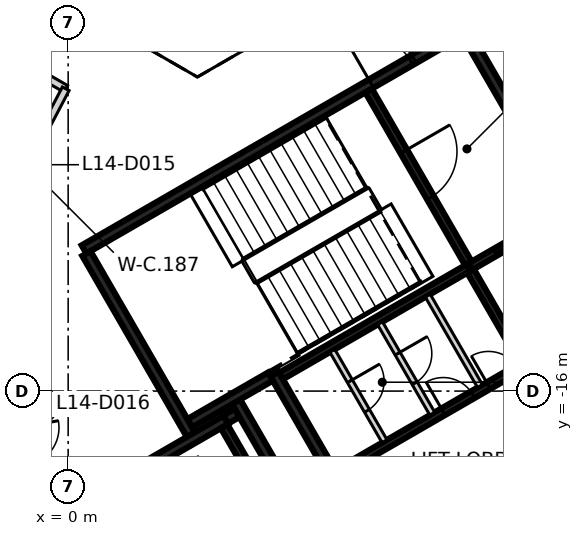
"""IFC4 building model, lengths in metres.
Left out: names, types, materials, properties, quantities, classifications, styles, units other than length and angle.
Written with IfcOpenShell. Run it as: python <this file> out.ifc"""

import sys

from ifc_helpers import new_model, si_unit, direction, frame, frame_2d, origin, place, context, subcontext, project, spatial, rectangle, extrude, element, fill, save


model = new_model("IFC4")
c1 = context("Model", 3, precision=1e-05, world=origin(), true_north=direction((0.0, 1.0)))
c2 = subcontext(c1, "Body", "Model", "MODEL_VIEW")
j1 = project(units=[si_unit("LENGTHUNIT", "METRE"), si_unit("PLANEANGLEUNIT", "RADIAN")], contexts=[c1])
p1 = place(None, origin())
s1 = spatial("IfcSite", under=j1, at=p1, CompositionType="ELEMENT")
p2 = place(p1, origin())
s2 = spatial("IfcBuilding", under=s1, at=p2, CompositionType="ELEMENT")
p3 = place(p2, frame((0.0, 0.0, 63.8)))
s3 = spatial("IfcBuildingStorey", under=s2, at=p3, CompositionType="ELEMENT", Elevation=63.8)
p4 = place(p3, frame((0.417, -12.273, 0.0), z_axis=(0.0, 0.0, 1.0), x_axis=(0.866021906294, 0.500006057782, 0.0)))
e1 = element("IfcWall", 1, at=p4, inside=s3, PredefinedType="SHEAR", context=c2, shape_type="SweptSolid", body=[
    extrude(rectangle(XDim=11.55, YDim=0.25, at=frame_2d((5.775, 0.0))), origin(), (0.0, 0.0, 1.0), 3.125),
])
p5 = place(p4, frame((10.025, 0.0, 0.0)))
e2 = element("IfcOpeningElement", 2, at=p5, cuts=e1, PredefinedType="OPENING", context=c2, shape_type="SweptSolid", body=[
    extrude(rectangle(XDim=1.2, YDim=2.1, at=frame_2d((0.6, 1.05))), frame((0.0, 0.135, 0.0), z_axis=(0.0, -1.0, 0.0), x_axis=(1.0, 0.0, 0.0)), (0.0, 0.0, 1.0), 0.27),
])
p6 = place(p4, frame((8.725, 0.0, 0.0)))
e3 = element("IfcOpeningElement", 3, at=p6, cuts=e1, PredefinedType="OPENING", context=c2, shape_type="SweptSolid", body=[
    extrude(rectangle(XDim=1.2, YDim=2.1, at=frame_2d((0.6, 1.05))), frame((0.0, 0.135, 0.0), z_axis=(0.0, -1.0, 0.0), x_axis=(1.0, 0.0, 0.0)), (0.0, 0.0, 1.0), 0.27),
])
p7 = place(p3, frame((3.235, -17.153, 0.0), z_axis=(0.0, 0.0, 1.0), x_axis=(-0.500008851346, 0.866020293397, 0.0)))
e4 = element("IfcWall", 4, at=p7, inside=s3, PredefinedType="SHEAR", context=c2, shape_type="SweptSolid", body=[
    extrude(rectangle(XDim=5.51, YDim=0.25, at=frame_2d((2.755, 0.0))), origin(), (0.0, 0.0, 1.0), 3.125),
])
p8 = place(p3, frame((10.483, -6.606, 0.0), z_axis=(0.0, 0.0, 1.0), x_axis=(0.49999885962, -0.866026062182, 0.0)))
e5 = element("IfcWall", 5, at=p8, inside=s3, PredefinedType="SHEAR", context=c2, shape_type="SweptSolid", body=[
    extrude(rectangle(XDim=5.225, YDim=0.25, at=frame_2d((2.612, 0.0))), origin(), (0.0, 0.0, 1.0), 3.125),
])
p9 = place(p3, frame((7.031, -18.327, 0.0), z_axis=(0.0, 0.0, 1.0), x_axis=(-0.499971222258, 0.866042017984, 0.0)))
e6 = element("IfcWall", 6, at=p9, inside=s3, PredefinedType="SHEAR", context=c2, shape_type="SweptSolid", body=[
    extrude(rectangle(XDim=3.2, YDim=0.25, at=frame_2d((1.6, 0.0))), origin(), (0.0, 0.0, 1.0), 3.125),
])
p10 = place(p3, frame((1.669, -18.19, 0.0), z_axis=(0.0, 0.0, 1.0), x_axis=(0.866042235819, 0.499970844928, 0.0)))
e7 = element("IfcWall", 7, at=p10, inside=s3, PredefinedType="SHEAR", context=c2, shape_type="SweptSolid", body=[
    extrude(rectangle(XDim=2.865, YDim=0.25, at=frame_2d((1.432, 0.0))), origin(), (0.0, 0.0, 1.0), 3.125),
])
p11 = place(p3, frame((4.414, -16.276, 0.0), z_axis=(0.0, 0.0, 1.0), x_axis=(0.500003324108, -0.866023484601, 0.0)))
e8 = element("IfcWall", 8, at=p11, inside=s3, PredefinedType="SHEAR", context=c2, shape_type="SweptSolid", body=[
    extrude(rectangle(XDim=3.085, YDim=0.25, at=frame_2d((1.542, 0.0))), origin(), (0.0, 0.0, 1.0), 3.125),
])
p12 = place(p3, frame((5.322, -15.619, 0.0), z_axis=(0.0, 0.0, 1.0), x_axis=(-0.866026229868, -0.499998569178, 0.0)))
e9 = element("IfcWall", 9, at=p12, inside=s3, PredefinedType="SHEAR", context=c2, shape_type="SweptSolid", body=[
    extrude(rectangle(XDim=2.449, YDim=0.25, at=frame_2d((1.225, 0.0))), origin(), (0.0, 0.0, 1.0), 3.125),
])
p13 = place(p3, frame((4.145, -16.749, 0.0), z_axis=(0.0, 0.0, 1.0), x_axis=(0.866185586049, 0.49972245349, 0.0)))
e10 = element("IfcWall", 10, at=p13, inside=s3, PredefinedType="SHEAR", context=c2, shape_type="SweptSolid", body=[
    extrude(rectangle(XDim=0.344, YDim=0.25, at=frame_2d((0.172, 0.0))), origin(), (0.0, 0.0, 1.0), 3.125),
])
p14 = place(p3, frame((9.052, -20.48, 0.0), z_axis=(0.0, 0.0, 1.0), x_axis=(0.866030299012, 0.499991521122, 0.0)))
e11 = element("IfcWall", 11, at=p14, inside=s3, PredefinedType="SHEAR", context=c2, shape_type="SweptSolid", body=[
    extrude(rectangle(XDim=6.1, YDim=0.2, at=frame_2d((3.05, 0.0))), origin(), (0.0, 0.0, 1.0), 3.125),
])
p15 = place(p14, frame((1.0, 0.0, 0.0)))
e12 = element("IfcOpeningElement", 12, at=p15, cuts=e11, PredefinedType="OPENING", context=c2, shape_type="SweptSolid", body=[
    extrude(rectangle(XDim=1.2, YDim=2.1, at=frame_2d((0.6, 1.05))), frame((0.0, 0.11, 0.0), z_axis=(0.0, -1.0, 0.0), x_axis=(1.0, 0.0, 0.0)), (0.0, 0.0, 1.0), 0.22),
])
p16 = place(p14, frame((4.05, 0.0, 0.0)))
e13 = element("IfcOpeningElement", 13, at=p16, cuts=e11, PredefinedType="OPENING", context=c2, shape_type="SweptSolid", body=[
    extrude(rectangle(XDim=1.2, YDim=2.1, at=frame_2d((0.6, 1.05))), frame((0.0, 0.11, 0.0), z_axis=(0.0, -1.0, 0.0), x_axis=(1.0, 0.0, 0.0)), (0.0, 0.0, 1.0), 0.22),
])
p17 = place(p3, frame((10.538, -12.752, 0.0), z_axis=(0.0, 0.0, 1.0), x_axis=(-0.866038630372, -0.499977090179, 0.0)))
e14 = element("IfcWall", 14, at=p17, inside=s3, PredefinedType="SHEAR", context=c2, shape_type="SweptSolid", body=[
    extrude(rectangle(XDim=5.699, YDim=0.2, at=frame_2d((2.85, 0.0))), origin(), (0.0, 0.0, 1.0), 3.125),
])
p18 = place(p3, frame((7.077, -18.156, 0.0), z_axis=(0.0, 0.0, 1.0), x_axis=(0.866038630372, 0.499977090179, 0.0)))
e15 = element("IfcWall", 15, at=p18, inside=s3, PredefinedType="SHEAR", context=c2, shape_type="SweptSolid", body=[
    extrude(rectangle(XDim=5.699, YDim=0.2, at=frame_2d((2.85, 0.0))), origin(), (0.0, 0.0, 1.0), 3.125),
])
p19 = place(p18, frame((3.224, 0.0, 0.0)))
e16 = element("IfcOpeningElement", 16, at=p19, cuts=e15, PredefinedType="OPENING", context=c2, shape_type="SweptSolid", body=[
    extrude(rectangle(XDim=0.9, YDim=2.1, at=frame_2d((0.45, 1.05))), frame((0.0, 0.11, 0.0), z_axis=(0.0, -1.0, 0.0), x_axis=(1.0, 0.0, 0.0)), (0.0, 0.0, 1.0), 0.22),
])
p20 = place(p18, frame((4.599, 0.0, 0.0)))
e17 = element("IfcOpeningElement", 17, at=p20, cuts=e15, PredefinedType="OPENING", context=c2, shape_type="SweptSolid", body=[
    extrude(rectangle(XDim=0.9, YDim=2.1, at=frame_2d((0.45, 1.05))), frame((0.0, 0.11, 0.0), z_axis=(0.0, -1.0, 0.0), x_axis=(1.0, 0.0, 0.0)), (0.0, 0.0, 1.0), 0.22),
])
p21 = place(p3, frame((7.906, -8.094, 0.0), z_axis=(0.0, 0.0, 1.0), x_axis=(0.500024287448, -0.866011380966, 0.0)))
e18 = element("IfcWall", 18, at=p21, inside=s3, PredefinedType="SHEAR", context=c2, shape_type="SweptSolid", body=[
    extrude(rectangle(XDim=5.251, YDim=0.2, at=frame_2d((2.625, 0.0))), origin(), (0.0, 0.0, 1.0), 3.125),
])
p22 = place(p21, frame((1.849, 0.0, 0.0)))
e19 = element("IfcOpeningElement", 19, at=p22, cuts=e18, PredefinedType="OPENING", context=c2, shape_type="SweptSolid", body=[
    extrude(rectangle(XDim=1.4, YDim=2.1, at=frame_2d((0.7, 1.05))), frame((0.0, 0.11, 0.0), z_axis=(0.0, -1.0, 0.0), x_axis=(1.0, 0.0, 0.0)), (0.0, 0.0, 1.0), 0.22),
])
p23 = place(p3, frame((5.503, -19.352, 0.0), z_axis=(0.0, 0.0, 1.0), x_axis=(-0.499986818241, 0.866033014143, 0.0)))
e20 = element("IfcWall", 20, at=p23, inside=s3, PredefinedType="SHEAR", context=c2, shape_type="SweptSolid", body=[
    extrude(rectangle(XDim=2.798, YDim=0.2, at=frame_2d((1.399, 0.0))), origin(), (0.0, 0.0, 1.0), 3.125),
])
p24 = place(p23, frame((0.949, 0.0, 0.0)))
e21 = element("IfcOpeningElement", 21, at=p24, cuts=e20, PredefinedType="OPENING", context=c2, shape_type="SweptSolid", body=[
    extrude(rectangle(XDim=0.9, YDim=2.1, at=frame_2d((0.45, 1.05))), frame((0.0, 0.11, 0.0), z_axis=(0.0, -1.0, 0.0), x_axis=(1.0, 0.0, 0.0)), (0.0, 0.0, 1.0), 0.22),
])
p25 = place(p3, frame((11.963, -15.22, 0.0), z_axis=(0.0, 0.0, 1.0), x_axis=(-0.500034990121, 0.866005201286, 0.0)))
e22 = element("IfcWall", 22, at=p25, inside=s3, PredefinedType="SHEAR", context=c2, shape_type="SweptSolid", body=[
    extrude(rectangle(XDim=2.75, YDim=0.2, at=frame_2d((1.375, 0.0))), origin(), (0.0, 0.0, 1.0), 3.125),
])
p26 = place(p3, frame((10.587, -12.723, 0.0), z_axis=(0.0, 0.0, 1.0), x_axis=(0.866037306777, 0.499979382845, 0.0)))
e23 = element("IfcWall", 23, at=p26, inside=s3, PredefinedType="SHEAR", context=c2, shape_type="SweptSolid", body=[
    extrude(rectangle(XDim=2.742, YDim=0.2, at=frame_2d((1.371, 0.0))), origin(), (0.0, 0.0, 1.0), 3.125),
])
p27 = place(p26, frame((0.743, 0.0, 0.0)))
e24 = element("IfcOpeningElement", 24, at=p27, cuts=e23, PredefinedType="OPENING", context=c2, shape_type="SweptSolid", body=[
    extrude(rectangle(XDim=1.3, YDim=2.1, at=frame_2d((0.65, 1.05))), frame((0.0, 0.11, 0.0), z_axis=(0.0, -1.0, 0.0), x_axis=(1.0, 0.0, 0.0)), (0.0, 0.0, 1.0), 0.22),
])
p28 = place(p3, frame((8.207, -14.214, 0.0), z_axis=(0.0, 0.0, 1.0), x_axis=(0.50002746344, -0.86600954718, 0.0)))
e25 = element("IfcWall", 25, at=p28, inside=s3, PredefinedType="PARTITIONING", context=c2, shape_type="SweptSolid", body=[
    extrude(rectangle(XDim=2.748, YDim=0.15, at=frame_2d((1.374, 0.0))), origin(), (0.0, 0.0, 1.0), 3.125),
])
p29 = place(p28, frame((0.924, 0.0, 0.0)))
e26 = element("IfcOpeningElement", 26, at=p29, cuts=e25, PredefinedType="OPENING", context=c2, shape_type="SweptSolid", body=[
    extrude(rectangle(XDim=0.9, YDim=2.1, at=frame_2d((0.45, 1.05))), frame((0.0, 0.085, 0.0), z_axis=(0.0, -1.0, 0.0), x_axis=(1.0, 0.0, 0.0)), (0.0, 0.0, 1.0), 0.17),
])
p30 = place(p3, frame((9.462, -13.489, 0.0), z_axis=(0.0, 0.0, 1.0), x_axis=(0.499988999718, -0.866031754707, 0.0)))
e27 = element("IfcWall", 27, at=p30, inside=s3, PredefinedType="PARTITIONING", context=c2, shape_type="SweptSolid", body=[
    extrude(rectangle(XDim=2.749, YDim=0.15, at=frame_2d((1.374, 0.0))), origin(), (0.0, 0.0, 1.0), 3.125),
])
p31 = place(p3, frame((6.951, -14.939, 0.0), z_axis=(0.0, 0.0, 1.0), x_axis=(0.499988999718, -0.866031754707, 0.0)))
e28 = element("IfcWall", 28, at=p31, inside=s3, PredefinedType="PARTITIONING", context=c2, shape_type="SweptSolid", body=[
    extrude(rectangle(XDim=2.749, YDim=0.15, at=frame_2d((1.374, 0.0))), origin(), (0.0, 0.0, 1.0), 3.125),
])
p32 = place(p31, frame((0.924, 0.0, 0.0)))
e29 = element("IfcOpeningElement", 29, at=p32, cuts=e28, PredefinedType="OPENING", context=c2, shape_type="SweptSolid", body=[
    extrude(rectangle(XDim=0.9, YDim=2.1, at=frame_2d((0.45, 1.05))), frame((0.0, 0.085, 0.0), z_axis=(0.0, -1.0, 0.0), x_axis=(1.0, 0.0, 0.0)), (0.0, 0.0, 1.0), 0.17),
])
p33 = place(p3, frame((-7.589, -3.702, 0.0), z_axis=(0.0, 0.0, 1.0), x_axis=(0.865995139556, -0.500052415518, 0.0)))
e30 = element("IfcWall", 30, at=p33, inside=s3, PredefinedType="PARTITIONING", context=c2, shape_type="SweptSolid", body=[
    extrude(rectangle(XDim=8.689, YDim=0.2, at=frame_2d((4.344, 0.0))), origin(), (0.0, 0.0, 1.0), 3.125),
])
p34 = place(p33, frame((0.749, 0.0, 0.0)))
e31 = element("IfcOpeningElement", 31, at=p34, cuts=e30, PredefinedType="OPENING", context=c2, shape_type="SweptSolid", body=[
    extrude(rectangle(XDim=1.0, YDim=2.1, at=frame_2d((0.5, 1.05))), frame((0.0, 0.11, 0.0), z_axis=(0.0, -1.0, 0.0), x_axis=(1.0, 0.0, 0.0)), (0.0, 0.0, 1.0), 0.22),
])
p35 = place(p33, frame((5.819, 0.0, 0.0)))
e32 = element("IfcOpeningElement", 32, at=p35, cuts=e30, PredefinedType="OPENING", context=c2, shape_type="SweptSolid", body=[
    extrude(rectangle(XDim=0.95, YDim=2.1, at=frame_2d((0.475, 1.05))), frame((0.0, 0.11, 0.0), z_axis=(0.0, -1.0, 0.0), x_axis=(1.0, 0.0, 0.0)), (0.0, 0.0, 1.0), 0.22),
])
p36 = place(p3, frame((-2.162, -12.041, 0.0), z_axis=(0.0, 0.0, 1.0), x_axis=(0.464956890881, 0.885333321197, 0.0)))
e33 = element("IfcWall", 33, at=p36, inside=s3, PredefinedType="PARTITIONING", context=c2, shape_type="SweptSolid", body=[
    extrude(rectangle(XDim=4.512, YDim=0.2, at=frame_2d((2.256, 0.0))), origin(), (0.0, 0.0, 1.0), 3.125),
])
p37 = place(p36, frame((1.756, 0.0, 0.0)))
e34 = element("IfcOpeningElement", 34, at=p37, cuts=e33, PredefinedType="OPENING", context=c2, shape_type="SweptSolid", body=[
    extrude(rectangle(XDim=1.0, YDim=2.1, at=frame_2d((0.5, 1.05))), frame((0.0, 0.11, 0.0), z_axis=(0.0, -1.0, 0.0), x_axis=(1.0, 0.0, 0.0)), (0.0, 0.0, 1.0), 0.22),
])
p38 = place(p27, origin())
e35 = element("IfcDoor", 35, at=p38, inside=s3, OperationType="SLIDING_TO_LEFT", PredefinedType="DOOR", context=c2, shape_type="SweptSolid", body=[
    extrude(rectangle(XDim=1.3, YDim=2.1, at=frame_2d((0.65, 1.05))), frame((0.0, 0.025, 0.0), z_axis=(0.0, -1.0, 0.0), x_axis=(1.0, 0.0, 0.0)), (0.0, 0.0, 1.0), 0.05),
])
fill(e24, e35)
p39 = place(p5, origin())
e36 = element("IfcDoor", 36, at=p39, inside=s3, OperationType="SINGLE_SWING_LEFT", PredefinedType="DOOR", context=c2, shape_type="SweptSolid", body=[
    extrude(rectangle(XDim=1.2, YDim=2.1, at=frame_2d((0.6, 1.05))), frame((0.0, 0.025, 0.0), z_axis=(0.0, -1.0, 0.0), x_axis=(1.0, 0.0, 0.0)), (0.0, 0.0, 1.0), 0.05),
])
fill(e2, e36)
p40 = place(p6, origin())
e37 = element("IfcDoor", 37, at=p40, inside=s3, OperationType="SINGLE_SWING_RIGHT", PredefinedType="DOOR", context=c2, shape_type="SweptSolid", body=[
    extrude(rectangle(XDim=1.2, YDim=2.1, at=frame_2d((0.6, 1.05))), frame((0.0, 0.025, 0.0), z_axis=(0.0, -1.0, 0.0), x_axis=(1.0, 0.0, 0.0)), (0.0, 0.0, 1.0), 0.05),
])
fill(e3, e37)
p41 = place(p22, origin())
e38 = element("IfcDoor", 38, at=p41, inside=s3, OperationType="SINGLE_SWING_LEFT", PredefinedType="DOOR", context=c2, shape_type="SweptSolid", body=[
    extrude(rectangle(XDim=1.4, YDim=2.1, at=frame_2d((0.7, 1.05))), frame((0.0, 0.025, 0.0), z_axis=(0.0, -1.0, 0.0), x_axis=(1.0, 0.0, 0.0)), (0.0, 0.0, 1.0), 0.05),
])
fill(e19, e38)
p42 = place(p19, origin())
e39 = element("IfcDoor", 39, at=p42, inside=s3, OperationType="SINGLE_SWING_RIGHT", PredefinedType="DOOR", context=c2, shape_type="SweptSolid", body=[
    extrude(rectangle(XDim=0.9, YDim=2.1, at=frame_2d((0.45, 1.05))), frame((0.0, 0.025, 0.0), z_axis=(0.0, -1.0, 0.0), x_axis=(1.0, 0.0, 0.0)), (0.0, 0.0, 1.0), 0.05),
])
fill(e16, e39)
p43 = place(p20, origin())
e40 = element("IfcDoor", 40, at=p43, inside=s3, OperationType="SINGLE_SWING_LEFT", PredefinedType="DOOR", context=c2, shape_type="SweptSolid", body=[
    extrude(rectangle(XDim=0.9, YDim=2.1, at=frame_2d((0.45, 1.05))), frame((0.0, 0.025, 0.0), z_axis=(0.0, -1.0, 0.0), x_axis=(1.0, 0.0, 0.0)), (0.0, 0.0, 1.0), 0.05),
])
fill(e17, e40)
p44 = place(p29, origin())
e41 = element("IfcDoor", 41, at=p44, inside=s3, OperationType="SINGLE_SWING_LEFT", PredefinedType="DOOR", context=c2, shape_type="SweptSolid", body=[
    extrude(rectangle(XDim=0.9, YDim=2.1, at=frame_2d((0.45, 1.05))), frame((0.0, 0.025, 0.0), z_axis=(0.0, -1.0, 0.0), x_axis=(1.0, 0.0, 0.0)), (0.0, 0.0, 1.0), 0.05),
])
fill(e26, e41)
p45 = place(p32, origin())
e42 = element("IfcDoor", 42, at=p45, inside=s3, OperationType="SINGLE_SWING_RIGHT", PredefinedType="DOOR", context=c2, shape_type="SweptSolid", body=[
    extrude(rectangle(XDim=0.9, YDim=2.1, at=frame_2d((0.45, 1.05))), frame((0.0, 0.025, 0.0), z_axis=(0.0, -1.0, 0.0), x_axis=(1.0, 0.0, 0.0)), (0.0, 0.0, 1.0), 0.05),
])
fill(e29, e42)
save(model, sys.argv[1])
